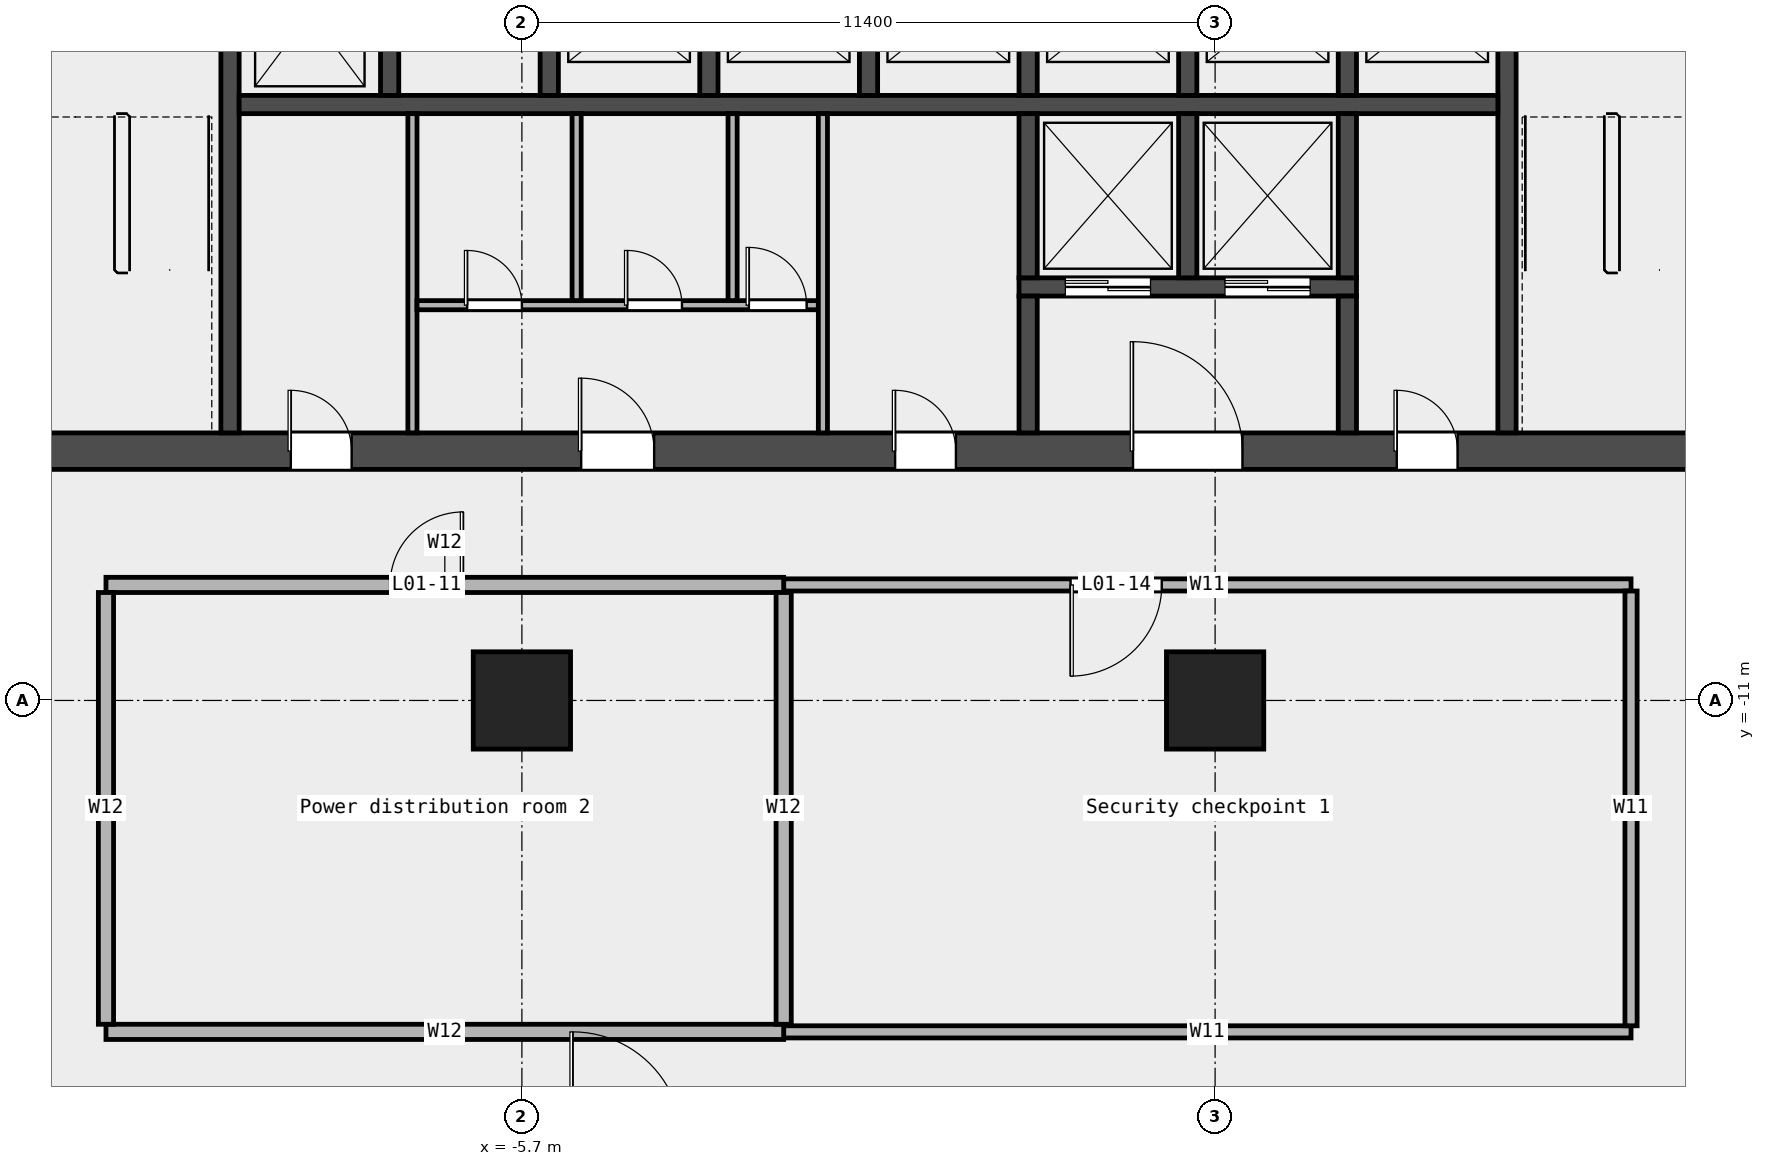
"""IFC4 building model, lengths in metres.
Left out: names, types, materials, properties, quantities, classifications, styles, units other than length and angle.
Written with IfcOpenShell. Run it as: python <this file> out.ifc"""

import sys

from ifc_helpers import new_model, si_unit, direction, frame, frame_2d, origin, origin_2d, place, context, subcontext, project, spatial, rectangle, extrude, element, fill, save


model = new_model("IFC4")
c1 = context("Model", 3, precision=1e-05, world=origin(), true_north=direction((0.0, 1.0)))
c2 = subcontext(c1, "Body", "Model", "MODEL_VIEW")
j1 = project(units=[si_unit("LENGTHUNIT", "METRE"), si_unit("PLANEANGLEUNIT", "RADIAN")], contexts=[c1])
p1 = place(None, origin())
s1 = spatial("IfcSite", under=j1, at=p1, CompositionType="ELEMENT")
p2 = place(p1, origin())
s2 = spatial("IfcBuilding", under=s1, at=p2, CompositionType="ELEMENT")
p3 = place(p2, frame((0.0, 0.0, 9.0)))
s3 = spatial("IfcBuildingStorey", under=s2, at=p3, CompositionType="ELEMENT", Elevation=9.0)
for number, where, z_axis, x_axis in (
    (1, (-5.7, -11.0, 0.0), (0.0, 0.0, 1.0), (1.0, 0.0, 0.0)),
    (2, (5.7, -11.0, 0.0), (0.0, 0.0, 1.0), (1.0, 0.0, 0.0)),
):
    element("IfcColumn", number, at=place(p3, frame(where, z_axis=z_axis, x_axis=x_axis)), inside=s3, PredefinedType="COLUMN", context=c2, shape_type="SweptSolid", body=[
        extrude(rectangle(XDim=1.6, YDim=1.6, at=origin_2d()), origin(), (0.0, 0.0, 1.0), 5.0),
    ])
p4 = place(p3, frame((-1.395, -16.45, 0.0), z_axis=(0.0, 0.0, 1.0), x_axis=(1.0, 0.0, 0.0)))
e3 = element("IfcWall", 3, at=p4, inside=s3, PredefinedType="PARTITIONING", context=c2, shape_type="SweptSolid", body=[
    extrude(rectangle(XDim=13.935, YDim=0.2, at=frame_2d((6.968, 0.0))), origin(), (0.0, 0.0, 1.0), 5.0),
])
p5 = place(p3, frame((-12.54, -16.45, 0.0), z_axis=(0.0, 0.0, 1.0), x_axis=(1.0, 0.0, 0.0)))
e4 = element("IfcWall", 4, at=p5, inside=s3, PredefinedType="PARTITIONING", context=c2, shape_type="SweptSolid", body=[
    extrude(rectangle(XDim=11.145, YDim=0.25, at=frame_2d((5.573, 0.0))), origin(), (0.0, 0.0, 1.0), 5.0),
])
p6 = place(p3, frame((-1.395, -9.1, 0.0), z_axis=(0.0, 0.0, 1.0), x_axis=(1.0, 0.0, 0.0)))
e5 = element("IfcWall", 5, at=p6, inside=s3, PredefinedType="PARTITIONING", context=c2, shape_type="SweptSolid", body=[
    extrude(rectangle(XDim=13.935, YDim=0.2, at=frame_2d((6.968, 0.0))), origin(), (0.0, 0.0, 1.0), 5.0),
])
p7 = place(p6, frame((4.718, 0.0, 0.0)))
e6 = element("IfcOpeningElement", 6, at=p7, cuts=e5, PredefinedType="OPENING", context=c2, shape_type="SweptSolid", body=[
    extrude(rectangle(XDim=1.5, YDim=2.1, at=frame_2d((0.75, 1.05))), frame((0.0, 0.112, 0.0), z_axis=(0.0, -1.0, 0.0), x_axis=(1.0, 0.0, 0.0)), (0.0, 0.0, 1.0), 0.224),
])
p8 = place(p3, frame((-12.54, -9.1, 0.0), z_axis=(0.0, 0.0, 1.0), x_axis=(1.0, 0.0, 0.0)))
e7 = element("IfcWall", 7, at=p8, inside=s3, PredefinedType="PARTITIONING", context=c2, shape_type="SweptSolid", body=[
    extrude(rectangle(XDim=11.145, YDim=0.25, at=frame_2d((5.573, 0.0))), origin(), (0.0, 0.0, 1.0), 5.0),
])
p9 = place(p8, frame((4.673, 0.0, 0.0)))
e8 = element("IfcOpeningElement", 8, at=p9, cuts=e7, PredefinedType="OPENING", context=c2, shape_type="SweptSolid", body=[
    extrude(rectangle(XDim=1.2, YDim=2.1, at=frame_2d((0.6, 1.05))), frame((0.0, 0.137, 0.0), z_axis=(0.0, -1.0, 0.0), x_axis=(1.0, 0.0, 0.0)), (0.0, 0.0, 1.0), 0.274),
])
for number, where, z_axis, x_axis in (
    (9, (-12.54, -16.325, 0.0), (0.0, 0.0, 1.0), (0.0, 1.0, 0.0)),
    (10, (-1.395, -16.325, 0.0), (0.0, 0.0, 1.0), (0.0, 1.0, 0.0)),
):
    element("IfcWall", number, at=place(p3, frame(where, z_axis=z_axis, x_axis=x_axis)), inside=s3, PredefinedType="PARTITIONING", context=c2, shape_type="SweptSolid", body=[
        extrude(rectangle(XDim=7.1, YDim=0.25, at=frame_2d((3.55, 0.0))), origin(), (0.0, 0.0, 1.0), 5.0),
    ])
p10 = place(p3, frame((12.54, -16.35, 0.0), z_axis=(0.0, 0.0, 1.0), x_axis=(0.0, 1.0, 0.0)))
e11 = element("IfcWall", 11, at=p10, inside=s3, PredefinedType="PARTITIONING", context=c2, shape_type="SweptSolid", body=[
    extrude(rectangle(XDim=7.15, YDim=0.2, at=frame_2d((3.575, 0.0))), origin(), (0.0, 0.0, 1.0), 5.0),
])
p11 = place(p3, frame((-14.4, -6.9, 0.0), z_axis=(0.0, 0.0, 1.0), x_axis=(1.0, 0.0, 0.0)))
e12 = element("IfcWall", 12, at=p11, inside=s3, PredefinedType="SHEAR", context=c2, shape_type="SweptSolid", body=[
    extrude(rectangle(XDim=28.8, YDim=0.6, at=frame_2d((14.4, 0.0))), origin(), (0.0, 0.0, 1.0), 5.2),
])
p12 = place(p11, frame((4.9, 0.0, 0.0)))
e13 = element("IfcOpeningElement", 13, at=p12, cuts=e12, PredefinedType="OPENING", context=c2, shape_type="SweptSolid", body=[
    extrude(rectangle(XDim=1.0, YDim=2.1, at=frame_2d((0.5, 1.05))), frame((0.0, 0.312, 0.0), z_axis=(0.0, -1.0, 0.0), x_axis=(1.0, 0.0, 0.0)), (0.0, 0.0, 1.0), 0.624),
])
p13 = place(p11, frame((9.675, 0.0, 0.0)))
e14 = element("IfcOpeningElement", 14, at=p13, cuts=e12, PredefinedType="OPENING", context=c2, shape_type="SweptSolid", body=[
    extrude(rectangle(XDim=1.2, YDim=2.1, at=frame_2d((0.6, 1.05))), frame((0.0, 0.312, 0.0), z_axis=(0.0, -1.0, 0.0), x_axis=(1.0, 0.0, 0.0)), (0.0, 0.0, 1.0), 0.624),
])
p14 = place(p11, frame((14.837, 0.0, 0.0)))
e15 = element("IfcOpeningElement", 15, at=p14, cuts=e12, PredefinedType="OPENING", context=c2, shape_type="SweptSolid", body=[
    extrude(rectangle(XDim=1.0, YDim=2.1, at=frame_2d((0.5, 1.05))), frame((0.0, 0.312, 0.0), z_axis=(0.0, -1.0, 0.0), x_axis=(1.0, 0.0, 0.0)), (0.0, 0.0, 1.0), 0.624),
])
p15 = place(p11, frame((18.75, 0.0, 0.0)))
e16 = element("IfcOpeningElement", 16, at=p15, cuts=e12, PredefinedType="OPENING", context=c2, shape_type="SweptSolid", body=[
    extrude(rectangle(XDim=1.8, YDim=2.1, at=frame_2d((0.9, 1.05))), frame((0.0, 0.312, 0.0), z_axis=(0.0, -1.0, 0.0), x_axis=(1.0, 0.0, 0.0)), (0.0, 0.0, 1.0), 0.624),
])
p16 = place(p11, frame((23.087, 0.0, 0.0)))
e17 = element("IfcOpeningElement", 17, at=p16, cuts=e12, PredefinedType="OPENING", context=c2, shape_type="SweptSolid", body=[
    extrude(rectangle(XDim=1.0, YDim=2.1, at=frame_2d((0.5, 1.05))), frame((0.0, 0.312, 0.0), z_axis=(0.0, -1.0, 0.0), x_axis=(1.0, 0.0, 0.0)), (0.0, 0.0, 1.0), 0.624),
])
for number, where, z_axis, x_axis in (
    (18, (-10.5, -6.6, 0.0), (0.0, 0.0, 1.0), (0.0, 1.0, 0.0)),
    (19, (10.5, -6.6, 0.0), (0.0, 0.0, 1.0), (0.0, 1.0, 0.0)),
):
    element("IfcWall", number, at=place(p3, frame(where, z_axis=z_axis, x_axis=x_axis)), inside=s3, PredefinedType="SHEAR", context=c2, shape_type="SweptSolid", body=[
        extrude(rectangle(XDim=8.55, YDim=0.3, at=frame_2d((4.275, 0.0))), origin(), (0.0, 0.0, 1.0), 5.2),
    ])
p17 = place(p3, frame((-10.35, -1.2, 0.0), z_axis=(0.0, 0.0, 1.0), x_axis=(1.0, 0.0, 0.0)))
e20 = element("IfcWall", 20, at=p17, inside=s3, PredefinedType="SOLIDWALL", context=c2, shape_type="SweptSolid", body=[
    extrude(rectangle(XDim=20.7, YDim=0.3, at=frame_2d((10.35, 0.0))), origin(), (0.0, 0.0, 1.0), 5.2),
])
for number, where, z_axis, x_axis in (
    (21, (-7.875, -1.05, 0.0), (0.0, 0.0, 1.0), (0.0, 1.0, 0.0)),
    (22, (-5.25, -1.05, 0.0), (0.0, 0.0, 1.0), (0.0, 1.0, 0.0)),
    (23, (-2.625, -1.05, 0.0), (0.0, 0.0, 1.0), (0.0, 1.0, 0.0)),
    (24, (0.0, -1.05, 0.0), (0.0, 0.0, 1.0), (0.0, 1.0, 0.0)),
    (25, (2.625, -1.05, 0.0), (0.0, 0.0, 1.0), (0.0, 1.0, 0.0)),
    (26, (5.25, -1.05, 0.0), (0.0, 0.0, 1.0), (0.0, 1.0, 0.0)),
    (27, (7.875, -1.05, 0.0), (0.0, 0.0, 1.0), (0.0, 1.0, 0.0)),
):
    element("IfcWall", number, at=place(p3, frame(where, z_axis=z_axis, x_axis=x_axis)), inside=s3, PredefinedType="SOLIDWALL", context=c2, shape_type="SweptSolid", body=[
        extrude(rectangle(XDim=2.7, YDim=0.3, at=frame_2d((1.35, 0.0))), origin(), (0.0, 0.0, 1.0), 5.2),
    ])
p18 = place(p3, frame((2.475, -4.2, 0.0), z_axis=(0.0, 0.0, 1.0), x_axis=(1.0, 0.0, 0.0)))
e28 = element("IfcWall", 28, at=p18, inside=s3, PredefinedType="SOLIDWALL", context=c2, shape_type="SweptSolid", body=[
    extrude(rectangle(XDim=5.55, YDim=0.3, at=frame_2d((2.775, 0.0))), origin(), (0.0, 0.0, 1.0), 5.2),
])
p19 = place(p18, frame((0.762, 0.0, 0.0)))
e29 = element("IfcOpeningElement", 29, at=p19, cuts=e28, PredefinedType="OPENING", context=c2, shape_type="SweptSolid", body=[
    extrude(rectangle(XDim=1.4, YDim=2.1, at=frame_2d((0.7, 1.05))), frame((0.0, 0.162, 0.0), z_axis=(0.0, -1.0, 0.0), x_axis=(1.0, 0.0, 0.0)), (0.0, 0.0, 1.0), 0.324),
])
p20 = place(p18, frame((3.387, 0.0, 0.0)))
e30 = element("IfcOpeningElement", 30, at=p20, cuts=e28, PredefinedType="OPENING", context=c2, shape_type="SweptSolid", body=[
    extrude(rectangle(XDim=1.4, YDim=2.1, at=frame_2d((0.7, 1.05))), frame((0.0, 0.162, 0.0), z_axis=(0.0, -1.0, 0.0), x_axis=(1.0, 0.0, 0.0)), (0.0, 0.0, 1.0), 0.324),
])
p21 = place(p3, frame((2.625, -4.05, 0.0), z_axis=(0.0, 0.0, 1.0), x_axis=(0.0, 1.0, 0.0)))
e31 = element("IfcWall", 31, at=p21, inside=s3, PredefinedType="SOLIDWALL", context=c2, shape_type="SweptSolid", body=[
    extrude(rectangle(XDim=2.7, YDim=0.3, at=frame_2d((1.35, 0.0))), origin(), (0.0, 0.0, 1.0), 5.2),
])
p22 = place(p3, frame((2.625, -6.6, 0.0), z_axis=(0.0, 0.0, 1.0), x_axis=(0.0, 1.0, 0.0)))
e32 = element("IfcWall", 32, at=p22, inside=s3, PredefinedType="SOLIDWALL", context=c2, shape_type="SweptSolid", body=[
    extrude(rectangle(XDim=2.25, YDim=0.3, at=frame_2d((1.125, 0.0))), origin(), (0.0, 0.0, 1.0), 5.2),
])
for number, where, z_axis, x_axis in (
    (33, (5.25, -4.05, 0.0), (0.0, 0.0, 1.0), (0.0, 1.0, 0.0)),
    (34, (7.875, -4.05, 0.0), (0.0, 0.0, 1.0), (0.0, 1.0, 0.0)),
):
    element("IfcWall", number, at=place(p3, frame(where, z_axis=z_axis, x_axis=x_axis)), inside=s3, PredefinedType="SOLIDWALL", context=c2, shape_type="SweptSolid", body=[
        extrude(rectangle(XDim=2.7, YDim=0.3, at=frame_2d((1.35, 0.0))), origin(), (0.0, 0.0, 1.0), 5.2),
    ])
p23 = place(p3, frame((7.875, -6.6, 0.0), z_axis=(0.0, 0.0, 1.0), x_axis=(0.0, 1.0, 0.0)))
e35 = element("IfcWall", 35, at=p23, inside=s3, PredefinedType="SOLIDWALL", context=c2, shape_type="SweptSolid", body=[
    extrude(rectangle(XDim=2.25, YDim=0.3, at=frame_2d((1.125, 0.0))), origin(), (0.0, 0.0, 1.0), 5.2),
])
p24 = place(p3, frame((-7.5, -6.6, 0.0), z_axis=(0.0, 0.0, 1.0), x_axis=(0.0, 1.0, 0.0)))
e36 = element("IfcWall", 36, at=p24, inside=s3, PredefinedType="PARTITIONING", context=c2, shape_type="SweptSolid", body=[
    extrude(rectangle(XDim=5.25, YDim=0.15, at=frame_2d((2.625, 0.0))), origin(), (0.0, 0.0, 1.0), 5.2),
])
p25 = place(p3, frame((-7.425, -4.5, 0.0), z_axis=(0.0, 0.0, 1.0), x_axis=(1.0, 0.0, 0.0)))
e37 = element("IfcWall", 37, at=p25, inside=s3, PredefinedType="PARTITIONING", context=c2, shape_type="SweptSolid", body=[
    extrude(rectangle(XDim=6.6, YDim=0.15, at=frame_2d((3.3, 0.0))), origin(), (0.0, 0.0, 1.0), 5.2),
])
p26 = place(p25, frame((0.825, 0.0, 0.0)))
e38 = element("IfcOpeningElement", 38, at=p26, cuts=e37, PredefinedType="OPENING", context=c2, shape_type="SweptSolid", body=[
    extrude(rectangle(XDim=0.9, YDim=2.1, at=frame_2d((0.45, 1.05))), frame((0.0, 0.087, 0.0), z_axis=(0.0, -1.0, 0.0), x_axis=(1.0, 0.0, 0.0)), (0.0, 0.0, 1.0), 0.174),
])
p27 = place(p25, frame((3.458, 0.0, 0.0)))
e39 = element("IfcOpeningElement", 39, at=p27, cuts=e37, PredefinedType="OPENING", context=c2, shape_type="SweptSolid", body=[
    extrude(rectangle(XDim=0.9, YDim=2.1, at=frame_2d((0.45, 1.05))), frame((0.0, 0.087, 0.0), z_axis=(0.0, -1.0, 0.0), x_axis=(1.0, 0.0, 0.0)), (0.0, 0.0, 1.0), 0.174),
])
p28 = place(p25, frame((5.458, 0.0, 0.0)))
e40 = element("IfcOpeningElement", 40, at=p28, cuts=e37, PredefinedType="OPENING", context=c2, shape_type="SweptSolid", body=[
    extrude(rectangle(XDim=0.95, YDim=2.1, at=frame_2d((0.475, 1.05))), frame((0.0, 0.087, 0.0), z_axis=(0.0, -1.0, 0.0), x_axis=(1.0, 0.0, 0.0)), (0.0, 0.0, 1.0), 0.174),
])
for number, where, z_axis, x_axis in (
    (41, (-4.8, -4.425, 0.0), (0.0, 0.0, 1.0), (0.0, 1.0, 0.0)),
    (42, (-2.235, -4.425, 0.0), (0.0, 0.0, 1.0), (0.0, 1.0, 0.0)),
):
    element("IfcWall", number, at=place(p3, frame(where, z_axis=z_axis, x_axis=x_axis)), inside=s3, PredefinedType="PARTITIONING", context=c2, shape_type="SweptSolid", body=[
        extrude(rectangle(XDim=3.075, YDim=0.15, at=frame_2d((1.538, 0.0))), origin(), (0.0, 0.0, 1.0), 5.2),
    ])
p29 = place(p3, frame((-0.75, -6.6, 0.0), z_axis=(0.0, 0.0, 1.0), x_axis=(0.0, 1.0, 0.0)))
e43 = element("IfcWall", 43, at=p29, inside=s3, PredefinedType="PARTITIONING", context=c2, shape_type="SweptSolid", body=[
    extrude(rectangle(XDim=5.25, YDim=0.15, at=frame_2d((2.625, 0.0))), origin(), (0.0, 0.0, 1.0), 5.2),
])
p30 = place(p9, origin())
e44 = element("IfcDoor", 44, at=p30, inside=s3, OperationType="SINGLE_SWING_RIGHT", PredefinedType="DOOR", context=c2, shape_type="SweptSolid", body=[
    extrude(rectangle(XDim=1.2, YDim=2.1, at=frame_2d((0.6, 1.05))), frame((0.0, 0.025, 0.0), z_axis=(0.0, -1.0, 0.0), x_axis=(1.0, 0.0, 0.0)), (0.0, 0.0, 1.0), 0.05),
])
fill(e8, e44)
p31 = place(p7, origin())
e45 = element("IfcDoor", 45, at=p31, inside=s3, OperationType="DOUBLE_DOOR_SINGLE_SWING", PredefinedType="DOOR", context=c2, shape_type="SweptSolid", body=[
    extrude(rectangle(XDim=1.5, YDim=2.1, at=frame_2d((0.75, 1.05))), frame((0.0, 0.025, 0.0), z_axis=(0.0, -1.0, 0.0), x_axis=(1.0, 0.0, 0.0)), (0.0, 0.0, 1.0), 0.05),
])
fill(e6, e45)
p32 = place(p19, origin())
e46 = element("IfcDoor", 46, at=p32, inside=s3, OperationType="DOUBLE_DOOR_SLIDING", PredefinedType="DOOR", context=c2, shape_type="SweptSolid", body=[
    extrude(rectangle(XDim=1.4, YDim=2.1, at=frame_2d((0.7, 1.05))), frame((0.0, 0.025, 0.0), z_axis=(0.0, -1.0, 0.0), x_axis=(1.0, 0.0, 0.0)), (0.0, 0.0, 1.0), 0.05),
])
fill(e29, e46)
p33 = place(p20, origin())
e47 = element("IfcDoor", 47, at=p33, inside=s3, OperationType="DOUBLE_DOOR_SLIDING", PredefinedType="DOOR", context=c2, shape_type="SweptSolid", body=[
    extrude(rectangle(XDim=1.4, YDim=2.1, at=frame_2d((0.7, 1.05))), frame((0.0, 0.025, 0.0), z_axis=(0.0, -1.0, 0.0), x_axis=(1.0, 0.0, 0.0)), (0.0, 0.0, 1.0), 0.05),
])
fill(e30, e47)
p34 = place(p12, origin())
e48 = element("IfcDoor", 48, at=p34, inside=s3, OperationType="SINGLE_SWING_LEFT", PredefinedType="DOOR", context=c2, shape_type="SweptSolid", body=[
    extrude(rectangle(XDim=1.0, YDim=2.1, at=frame_2d((0.5, 1.05))), frame((0.0, 0.025, 0.0), z_axis=(0.0, -1.0, 0.0), x_axis=(1.0, 0.0, 0.0)), (0.0, 0.0, 1.0), 0.05),
])
fill(e13, e48)
p35 = place(p13, origin())
e49 = element("IfcDoor", 49, at=p35, inside=s3, OperationType="SINGLE_SWING_LEFT", PredefinedType="DOOR", context=c2, shape_type="SweptSolid", body=[
    extrude(rectangle(XDim=1.2, YDim=2.1, at=frame_2d((0.6, 1.05))), frame((0.0, 0.025, 0.0), z_axis=(0.0, -1.0, 0.0), x_axis=(1.0, 0.0, 0.0)), (0.0, 0.0, 1.0), 0.05),
])
fill(e14, e49)
p36 = place(p26, origin())
e50 = element("IfcDoor", 50, at=p36, inside=s3, OperationType="SINGLE_SWING_LEFT", PredefinedType="DOOR", context=c2, shape_type="SweptSolid", body=[
    extrude(rectangle(XDim=0.9, YDim=2.1, at=frame_2d((0.45, 1.05))), frame((0.0, 0.025, 0.0), z_axis=(0.0, -1.0, 0.0), x_axis=(1.0, 0.0, 0.0)), (0.0, 0.0, 1.0), 0.05),
])
fill(e38, e50)
p37 = place(p27, origin())
e51 = element("IfcDoor", 51, at=p37, inside=s3, OperationType="SINGLE_SWING_LEFT", PredefinedType="DOOR", context=c2, shape_type="SweptSolid", body=[
    extrude(rectangle(XDim=0.9, YDim=2.1, at=frame_2d((0.45, 1.05))), frame((0.0, 0.025, 0.0), z_axis=(0.0, -1.0, 0.0), x_axis=(1.0, 0.0, 0.0)), (0.0, 0.0, 1.0), 0.05),
])
fill(e39, e51)
p38 = place(p28, origin())
e52 = element("IfcDoor", 52, at=p38, inside=s3, OperationType="SINGLE_SWING_LEFT", PredefinedType="DOOR", context=c2, shape_type="SweptSolid", body=[
    extrude(rectangle(XDim=0.95, YDim=2.1, at=frame_2d((0.475, 1.05))), frame((0.0, 0.025, 0.0), z_axis=(0.0, -1.0, 0.0), x_axis=(1.0, 0.0, 0.0)), (0.0, 0.0, 1.0), 0.05),
])
fill(e40, e52)
p39 = place(p14, origin())
e53 = element("IfcDoor", 53, at=p39, inside=s3, OperationType="SINGLE_SWING_LEFT", PredefinedType="DOOR", context=c2, shape_type="SweptSolid", body=[
    extrude(rectangle(XDim=1.0, YDim=2.1, at=frame_2d((0.5, 1.05))), frame((0.0, 0.025, 0.0), z_axis=(0.0, -1.0, 0.0), x_axis=(1.0, 0.0, 0.0)), (0.0, 0.0, 1.0), 0.05),
])
fill(e15, e53)
p40 = place(p15, origin())
e54 = element("IfcDoor", 54, at=p40, inside=s3, OperationType="DOUBLE_DOOR_SINGLE_SWING", PredefinedType="DOOR", context=c2, shape_type="SweptSolid", body=[
    extrude(rectangle(XDim=1.8, YDim=2.1, at=frame_2d((0.9, 1.05))), frame((0.0, 0.025, 0.0), z_axis=(0.0, -1.0, 0.0), x_axis=(1.0, 0.0, 0.0)), (0.0, 0.0, 1.0), 0.05),
])
fill(e16, e54)
p41 = place(p16, origin())
e55 = element("IfcDoor", 55, at=p41, inside=s3, OperationType="SINGLE_SWING_LEFT", PredefinedType="DOOR", context=c2, shape_type="SweptSolid", body=[
    extrude(rectangle(XDim=1.0, YDim=2.1, at=frame_2d((0.5, 1.05))), frame((0.0, 0.025, 0.0), z_axis=(0.0, -1.0, 0.0), x_axis=(1.0, 0.0, 0.0)), (0.0, 0.0, 1.0), 0.05),
])
fill(e17, e55)
save(model, sys.argv[1])
